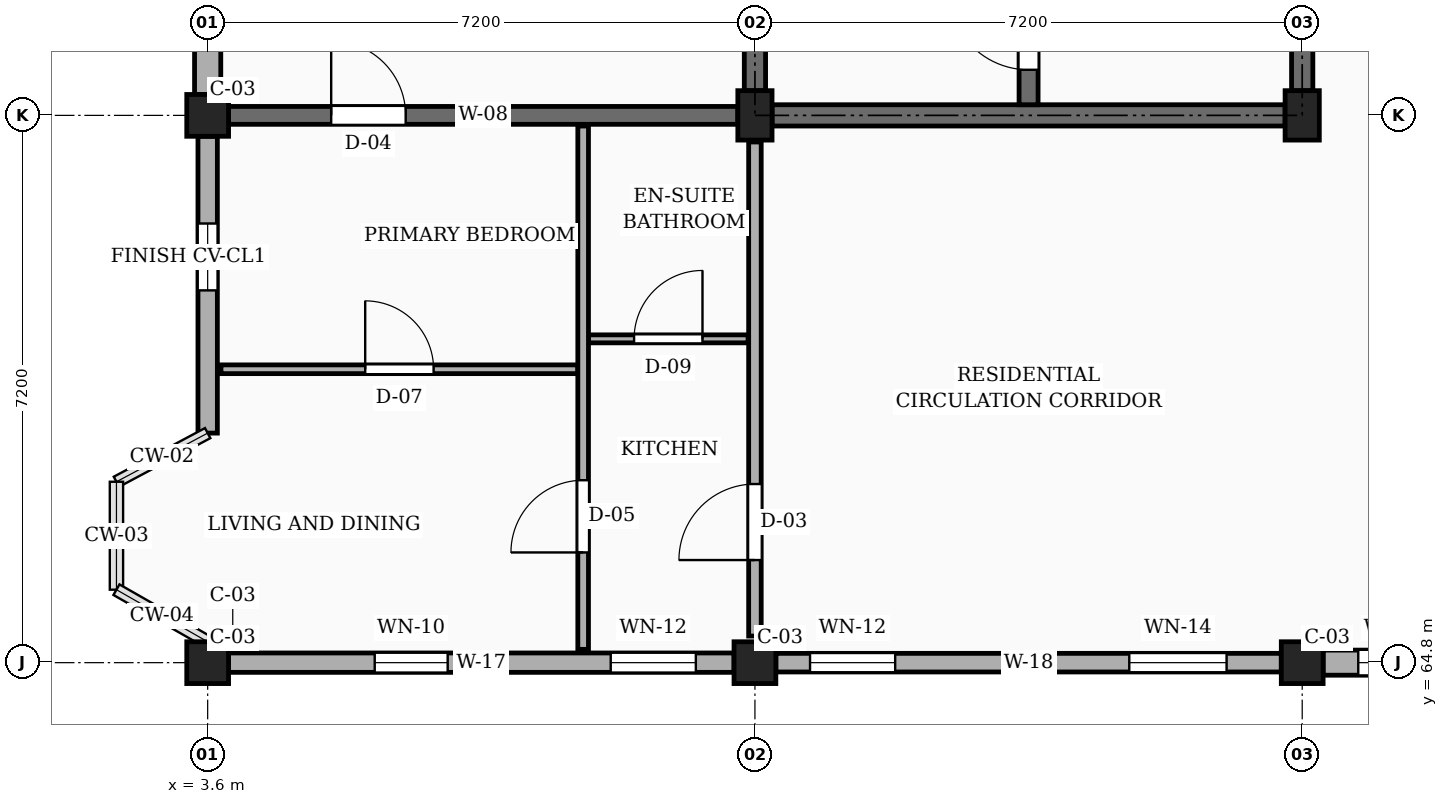
"""IFC4 building model, lengths in metres.
Left out: names, types, materials, properties, quantities, classifications, styles, units other than length and angle.
Written with IfcOpenShell. Run it as: python <this file> out.ifc"""

import sys

from ifc_helpers import new_model, si_unit, direction, frame, frame_2d, origin, origin_2d, place, context, subcontext, project, spatial, rectangle, extrude, element, fill, save


model = new_model("IFC4")
c1 = context("Model", 3, precision=1e-05, world=origin(), true_north=direction((0.0, 1.0)))
c2 = subcontext(c1, "Body", "Model", "MODEL_VIEW")
j1 = project(units=[si_unit("LENGTHUNIT", "METRE"), si_unit("PLANEANGLEUNIT", "RADIAN")], contexts=[c1])
p1 = place(None, origin())
s1 = spatial("IfcSite", under=j1, at=p1, CompositionType="ELEMENT")
p2 = place(p1, origin())
s2 = spatial("IfcBuilding", under=s1, at=p2, CompositionType="ELEMENT")
p3 = place(p2, frame((0.0, 0.0, 17.1)))
s3 = spatial("IfcBuildingStorey", under=s2, at=p3, CompositionType="ELEMENT", Elevation=17.1)
for number, where, z_axis, x_axis in (
    (1, (3.6, 64.8, 0.0), (0.0, 0.0, 1.0), (1.0, 0.0, 0.0)),
    (2, (3.6, 72.0, 0.0), (0.0, 0.0, 1.0), (1.0, 0.0, 0.0)),
    (3, (10.8, 64.8, 0.0), (0.0, 0.0, 1.0), (1.0, 0.0, 0.0)),
):
    element("IfcColumn", number, at=place(p3, frame(where, z_axis=z_axis, x_axis=x_axis)), inside=s3, PredefinedType="COLUMN", context=c2, shape_type="SweptSolid", body=[
        extrude(rectangle(XDim=0.55, YDim=0.55, at=origin_2d()), origin(), (0.0, 0.0, 1.0), 3.15),
    ])
p4 = place(p3, frame((10.8, 72.0, 0.0), z_axis=(0.0, 0.0, 1.0), x_axis=(1.0, 0.0, 0.0)))
e4 = element("IfcColumn", 4, at=p4, inside=s3, PredefinedType="COLUMN", context=c2, shape_type="SweptSolid", body=[
    extrude(rectangle(XDim=0.45, YDim=0.65, at=origin_2d()), origin(), (0.0, 0.0, 1.0), 3.15),
])
p5 = place(p3, frame((18.0, 64.8, 0.0), z_axis=(0.0, 0.0, 1.0), x_axis=(1.0, 0.0, 0.0)))
e5 = element("IfcColumn", 5, at=p5, inside=s3, PredefinedType="COLUMN", context=c2, shape_type="SweptSolid", body=[
    extrude(rectangle(XDim=0.55, YDim=0.55, at=origin_2d()), origin(), (0.0, 0.0, 1.0), 3.15),
])
p6 = place(p3, frame((18.0, 72.0, 0.0), z_axis=(0.0, 0.0, 1.0), x_axis=(1.0, 0.0, 0.0)))
e6 = element("IfcColumn", 6, at=p6, inside=s3, PredefinedType="COLUMN", context=c2, shape_type="SweptSolid", body=[
    extrude(rectangle(XDim=0.45, YDim=0.65, at=origin_2d()), origin(), (0.0, 0.0, 1.0), 3.15),
])
p7 = place(p3, frame((3.875, 72.0, 0.0), z_axis=(0.0, 0.0, 1.0), x_axis=(1.0, 0.0, 0.0)))
e7 = element("IfcWall", 7, at=p7, inside=s3, PredefinedType="SOLIDWALL", context=c2, shape_type="SweptSolid", body=[
    extrude(rectangle(XDim=6.7, YDim=0.235, at=frame_2d((3.35, 0.0))), origin(), (0.0, 0.0, 1.0), 2.21),
])
p8 = place(p7, frame((1.35, 0.0, 0.0)))
e8 = element("IfcOpeningElement", 8, at=p8, cuts=e7, PredefinedType="OPENING", context=c2, shape_type="SweptSolid", body=[
    extrude(rectangle(XDim=0.98, YDim=2.12, at=frame_2d((0.49, 1.06))), frame((0.0, 0.127, 0.0), z_axis=(0.0, -1.0, 0.0), x_axis=(1.0, 0.0, 0.0)), (0.0, 0.0, 1.0), 0.255),
])
p9 = place(p3, frame((3.875, 64.8, 0.0), z_axis=(0.0, 0.0, 1.0), x_axis=(1.0, 0.0, 0.0)))
e9 = element("IfcWall", 9, at=p9, inside=s3, PredefinedType="SOLIDWALL", context=c2, shape_type="SweptSolid", body=[
    extrude(rectangle(XDim=6.65, YDim=0.255, at=frame_2d((3.325, 0.0))), origin(), (0.0, 0.0, 1.0), 2.48),
])
p10 = place(p9, frame((1.923, 0.0, 0.78)))
e10 = element("IfcOpeningElement", 10, at=p10, cuts=e9, PredefinedType="OPENING", context=c2, shape_type="SweptSolid", body=[
    extrude(rectangle(XDim=0.96, YDim=1.26, at=frame_2d((0.48, 0.63))), frame((0.0, 0.137, 0.0), z_axis=(0.0, -1.0, 0.0), x_axis=(1.0, 0.0, 0.0)), (0.0, 0.0, 1.0), 0.275),
])
p11 = place(p9, frame((5.028, 0.0, 0.78)))
e11 = element("IfcOpeningElement", 11, at=p11, cuts=e9, PredefinedType="OPENING", context=c2, shape_type="SweptSolid", body=[
    extrude(rectangle(XDim=1.12, YDim=1.26, at=frame_2d((0.56, 0.63))), frame((0.0, 0.137, 0.0), z_axis=(0.0, -1.0, 0.0), x_axis=(1.0, 0.0, 0.0)), (0.0, 0.0, 1.0), 0.275),
])
p12 = place(p3, frame((11.075, 64.8, 0.0), z_axis=(0.0, 0.0, 1.0), x_axis=(1.0, 0.0, 0.0)))
e12 = element("IfcWall", 12, at=p12, inside=s3, PredefinedType="SOLIDWALL", context=c2, shape_type="SweptSolid", body=[
    extrude(rectangle(XDim=6.65, YDim=0.245, at=frame_2d((3.325, 0.0))), origin(), (0.0, 0.0, 1.0), 2.48),
])
p13 = place(p12, frame((0.45, 0.0, 0.78)))
e13 = element("IfcOpeningElement", 13, at=p13, cuts=e12, PredefinedType="OPENING", context=c2, shape_type="SweptSolid", body=[
    extrude(rectangle(XDim=1.12, YDim=1.26, at=frame_2d((0.56, 0.63))), frame((0.0, 0.133, 0.0), z_axis=(0.0, -1.0, 0.0), x_axis=(1.0, 0.0, 0.0)), (0.0, 0.0, 1.0), 0.265),
])
p14 = place(p12, frame((4.65, 0.0, 0.78)))
e14 = element("IfcOpeningElement", 14, at=p14, cuts=e12, PredefinedType="OPENING", context=c2, shape_type="SweptSolid", body=[
    extrude(rectangle(XDim=1.28, YDim=1.26, at=frame_2d((0.64, 0.63))), frame((0.0, 0.133, 0.0), z_axis=(0.0, -1.0, 0.0), x_axis=(1.0, 0.0, 0.0)), (0.0, 0.0, 1.0), 0.265),
])
p15 = place(p3, frame((18.275, 64.8, 0.0), z_axis=(0.0, 0.0, 1.0), x_axis=(1.0, 0.0, 0.0)))
e15 = element("IfcWall", 15, at=p15, inside=s3, PredefinedType="SOLIDWALL", context=c2, shape_type="SweptSolid", body=[
    extrude(rectangle(XDim=6.65, YDim=0.33, at=frame_2d((3.325, 0.0))), origin(), (0.0, 0.0, 1.0), 2.48),
])
p16 = place(p15, frame((0.462, 0.0, 0.78)))
e16 = element("IfcOpeningElement", 16, at=p16, cuts=e15, PredefinedType="OPENING", context=c2, shape_type="SweptSolid", body=[
    extrude(rectangle(XDim=1.04, YDim=1.26, at=frame_2d((0.52, 0.63))), frame((0.0, 0.175, 0.0), z_axis=(0.0, -1.0, 0.0), x_axis=(1.0, 0.0, 0.0)), (0.0, 0.0, 1.0), 0.35),
])
p17 = place(p15, frame((2.115, 0.0, 0.78)))
e17 = element("IfcOpeningElement", 17, at=p17, cuts=e15, PredefinedType="OPENING", context=c2, shape_type="SweptSolid", body=[
    extrude(rectangle(XDim=1.44, YDim=1.26, at=frame_2d((0.72, 0.63))), frame((0.0, 0.175, 0.0), z_axis=(0.0, -1.0, 0.0), x_axis=(1.0, 0.0, 0.0)), (0.0, 0.0, 1.0), 0.35),
])
p18 = place(p15, frame((4.688, 0.0, 0.78)))
e18 = element("IfcOpeningElement", 18, at=p18, cuts=e15, PredefinedType="OPENING", context=c2, shape_type="SweptSolid", body=[
    extrude(rectangle(XDim=0.98, YDim=1.36, at=frame_2d((0.49, 0.68))), frame((0.0, 0.175, 0.0), z_axis=(0.0, -1.0, 0.0), x_axis=(1.0, 0.0, 0.0)), (0.0, 0.0, 1.0), 0.35),
])
p19 = place(p3, frame((3.6, 78.925, 0.0), z_axis=(0.0, 0.0, 1.0), x_axis=(0.0, -1.0, 0.0)))
e19 = element("IfcWall", 19, at=p19, inside=s3, PredefinedType="SOLIDWALL", context=c2, shape_type="SweptSolid", body=[
    extrude(rectangle(XDim=6.65, YDim=0.345, at=frame_2d((3.325, 0.0))), origin(), (0.0, 0.0, 1.0), 2.48),
])
p20 = place(p19, frame((0.45, 0.0, 0.78)))
e20 = element("IfcOpeningElement", 20, at=p20, cuts=e19, PredefinedType="OPENING", context=c2, shape_type="SweptSolid", body=[
    extrude(rectangle(XDim=1.32, YDim=1.15, at=frame_2d((0.66, 0.575))), frame((0.0, 0.183, 0.0), z_axis=(0.0, -1.0, 0.0), x_axis=(1.0, 0.0, 0.0)), (0.0, 0.0, 1.0), 0.365),
])
p21 = place(p19, frame((4.65, 0.0, 0.78)))
e21 = element("IfcOpeningElement", 21, at=p21, cuts=e19, PredefinedType="OPENING", context=c2, shape_type="SweptSolid", body=[
    extrude(rectangle(XDim=0.88, YDim=1.26, at=frame_2d((0.44, 0.63))), frame((0.0, 0.183, 0.0), z_axis=(0.0, -1.0, 0.0), x_axis=(1.0, 0.0, 0.0)), (0.0, 0.0, 1.0), 0.365),
])
p22 = place(p3, frame((3.6, 71.725, 0.0), z_axis=(0.0, 0.0, 1.0), x_axis=(0.0, -1.0, 0.0)))
e22 = element("IfcWall", 22, at=p22, inside=s3, PredefinedType="SOLIDWALL", context=c2, shape_type="SweptSolid", body=[
    extrude(rectangle(XDim=3.905, YDim=0.255, at=frame_2d((1.953, 0.0))), origin(), (0.0, 0.0, 1.0), 2.48),
])
p23 = place(p22, frame((1.147, 0.0, 0.78)))
e23 = element("IfcOpeningElement", 23, at=p23, cuts=e22, PredefinedType="OPENING", context=c2, shape_type="SweptSolid", body=[
    extrude(rectangle(XDim=0.88, YDim=1.26, at=frame_2d((0.44, 0.63))), frame((0.0, 0.137, 0.0), z_axis=(0.0, -1.0, 0.0), x_axis=(1.0, 0.0, 0.0)), (0.0, 0.0, 1.0), 0.275),
])
p24 = place(p3, frame((10.8, 72.325, 0.0), z_axis=(0.0, 0.0, 1.0), x_axis=(0.0, 1.0, 0.0)))
e24 = element("IfcWall", 24, at=p24, inside=s3, PredefinedType="SHEAR", context=c2, shape_type="SweptSolid", body=[
    extrude(rectangle(XDim=6.55, YDim=0.28, at=frame_2d((3.275, 0.0))), origin(), (0.0, 0.0, 1.0), 2.91),
])
p25 = place(p3, frame((18.0, 72.325, 0.0), z_axis=(0.0, 0.0, 1.0), x_axis=(0.0, 1.0, 0.0)))
e25 = element("IfcWall", 25, at=p25, inside=s3, PredefinedType="SHEAR", context=c2, shape_type="SweptSolid", body=[
    extrude(rectangle(XDim=6.55, YDim=0.28, at=frame_2d((3.275, 0.0))), origin(), (0.0, 0.0, 1.0), 2.91),
])
p26 = place(p25, frame((1.5, 0.0, 0.0)))
e26 = element("IfcOpeningElement", 26, at=p26, cuts=e25, PredefinedType="OPENING", context=c2, shape_type="SweptSolid", body=[
    extrude(rectangle(XDim=1.1, YDim=2.15, at=frame_2d((0.55, 1.075))), frame((0.0, 0.15, 0.0), z_axis=(0.0, -1.0, 0.0), x_axis=(1.0, 0.0, 0.0)), (0.0, 0.0, 1.0), 0.3),
])
p27 = place(p3, frame((11.025, 72.0, 0.0), z_axis=(0.0, 0.0, 1.0), x_axis=(1.0, 0.0, 0.0)))
e27 = element("IfcWall", 27, at=p27, inside=s3, PredefinedType="SHEAR", context=c2, shape_type="SweptSolid", body=[
    extrude(rectangle(XDim=6.75, YDim=0.28, at=frame_2d((3.375, 0.0))), origin(), (0.0, 0.0, 1.0), 2.91),
])
p28 = place(p3, frame((14.4, 72.14, 0.0), z_axis=(0.0, 0.0, 1.0), x_axis=(0.0, 1.0, 0.0)))
e28 = element("IfcWall", 28, at=p28, inside=s3, PredefinedType="SHEAR", context=c2, shape_type="SweptSolid", body=[
    extrude(rectangle(XDim=6.92, YDim=0.25, at=frame_2d((3.46, 0.0))), origin(), (0.0, 0.0, 1.0), 2.91),
])
p29 = place(p28, frame((0.46, 0.0, 0.0)))
e29 = element("IfcOpeningElement", 29, at=p29, cuts=e28, PredefinedType="OPENING", context=c2, shape_type="SweptSolid", body=[
    extrude(rectangle(XDim=1.05, YDim=2.15, at=frame_2d((0.525, 1.075))), frame((0.0, 0.135, 0.0), z_axis=(0.0, -1.0, 0.0), x_axis=(1.0, 0.0, 0.0)), (0.0, 0.0, 1.0), 0.27),
])
p30 = place(p3, frame((10.8, 65.15, 0.0), z_axis=(0.0, 0.0, 1.0), x_axis=(0.0, 1.0, 0.0)))
e30 = element("IfcWall", 30, at=p30, inside=s3, PredefinedType="PARTITIONING", context=c2, shape_type="SweptSolid", body=[
    extrude(rectangle(XDim=6.5, YDim=0.165, at=frame_2d((3.25, 0.0))), origin(), (0.0, 0.0, 1.0), 2.345),
])
p31 = place(p30, frame((1.0, 0.0, 0.0)))
e31 = element("IfcOpeningElement", 31, at=p31, cuts=e30, PredefinedType="OPENING", context=c2, shape_type="SweptSolid", body=[
    extrude(rectangle(XDim=1.0, YDim=2.15, at=frame_2d((0.5, 1.075))), frame((0.0, 0.093, 0.0), z_axis=(0.0, -1.0, 0.0), x_axis=(1.0, 0.0, 0.0)), (0.0, 0.0, 1.0), 0.185),
])
p32 = place(p3, frame((3.775, 68.66, 0.0), z_axis=(0.0, 0.0, 1.0), x_axis=(1.0, 0.0, 0.0)))
e32 = element("IfcWall", 32, at=p32, inside=s3, PredefinedType="PARTITIONING", context=c2, shape_type="SweptSolid", body=[
    extrude(rectangle(XDim=4.695, YDim=0.115, at=frame_2d((2.348, 0.0))), origin(), (0.0, 0.0, 1.0), 2.345),
])
p33 = place(p32, frame((1.897, 0.0, 0.0)))
e33 = element("IfcOpeningElement", 33, at=p33, cuts=e32, PredefinedType="OPENING", context=c2, shape_type="SweptSolid", body=[
    extrude(rectangle(XDim=0.9, YDim=2.1, at=frame_2d((0.45, 1.05))), frame((0.0, 0.067, 0.0), z_axis=(0.0, -1.0, 0.0), x_axis=(1.0, 0.0, 0.0)), (0.0, 0.0, 1.0), 0.135),
])
p34 = place(p3, frame((8.61, 69.06, 0.0), z_axis=(0.0, 0.0, 1.0), x_axis=(1.0, 0.0, 0.0)))
e34 = element("IfcWall", 34, at=p34, inside=s3, PredefinedType="PARTITIONING", context=c2, shape_type="SweptSolid", body=[
    extrude(rectangle(XDim=2.1, YDim=0.105, at=frame_2d((1.05, 0.0))), origin(), (0.0, 0.0, 1.0), 2.345),
])
p35 = place(p34, frame((0.6, 0.0, 0.0)))
e35 = element("IfcOpeningElement", 35, at=p35, cuts=e34, PredefinedType="OPENING", context=c2, shape_type="SweptSolid", body=[
    extrude(rectangle(XDim=0.9, YDim=2.05, at=frame_2d((0.45, 1.025))), frame((0.0, 0.062, 0.0), z_axis=(0.0, -1.0, 0.0), x_axis=(1.0, 0.0, 0.0)), (0.0, 0.0, 1.0), 0.125),
])
p36 = place(p3, frame((8.54, 64.975, 0.0), z_axis=(0.0, 0.0, 1.0), x_axis=(0.0, 1.0, 0.0)))
e36 = element("IfcWall", 36, at=p36, inside=s3, PredefinedType="PARTITIONING", context=c2, shape_type="SweptSolid", body=[
    extrude(rectangle(XDim=6.885, YDim=0.14, at=frame_2d((3.442, 0.0))), origin(), (0.0, 0.0, 1.0), 2.345),
])
p37 = place(p36, frame((1.275, 0.0, 0.0)))
e37 = element("IfcOpeningElement", 37, at=p37, cuts=e36, PredefinedType="OPENING", context=c2, shape_type="SweptSolid", body=[
    extrude(rectangle(XDim=0.95, YDim=2.1, at=frame_2d((0.475, 1.05))), frame((0.0, 0.08, 0.0), z_axis=(0.0, -1.0, 0.0), x_axis=(1.0, 0.0, 0.0)), (0.0, 0.0, 1.0), 0.16),
])
p38 = place(p10, origin())
e38 = element("IfcWindow", 38, at=p38, inside=s3, PartitioningType="SINGLE_PANEL", PredefinedType="WINDOW", context=c2, shape_type="SweptSolid", body=[
    extrude(rectangle(XDim=0.96, YDim=1.26, at=frame_2d((0.48, 0.63))), frame((0.0, 0.03, 0.0), z_axis=(0.0, -1.0, 0.0), x_axis=(1.0, 0.0, 0.0)), (0.0, 0.0, 1.0), 0.06),
])
fill(e10, e38)
p39 = place(p11, origin())
e39 = element("IfcWindow", 39, at=p39, inside=s3, PartitioningType="SINGLE_PANEL", PredefinedType="WINDOW", context=c2, shape_type="SweptSolid", body=[
    extrude(rectangle(XDim=1.12, YDim=1.26, at=frame_2d((0.56, 0.63))), frame((0.0, 0.03, 0.0), z_axis=(0.0, -1.0, 0.0), x_axis=(1.0, 0.0, 0.0)), (0.0, 0.0, 1.0), 0.06),
])
fill(e11, e39)
p40 = place(p13, origin())
e40 = element("IfcWindow", 40, at=p40, inside=s3, PartitioningType="SINGLE_PANEL", PredefinedType="WINDOW", context=c2, shape_type="SweptSolid", body=[
    extrude(rectangle(XDim=1.12, YDim=1.26, at=frame_2d((0.56, 0.63))), frame((0.0, 0.03, 0.0), z_axis=(0.0, -1.0, 0.0), x_axis=(1.0, 0.0, 0.0)), (0.0, 0.0, 1.0), 0.06),
])
fill(e13, e40)
p41 = place(p14, origin())
e41 = element("IfcWindow", 41, at=p41, inside=s3, PartitioningType="SINGLE_PANEL", PredefinedType="WINDOW", context=c2, shape_type="SweptSolid", body=[
    extrude(rectangle(XDim=1.28, YDim=1.26, at=frame_2d((0.64, 0.63))), frame((0.0, 0.03, 0.0), z_axis=(0.0, -1.0, 0.0), x_axis=(1.0, 0.0, 0.0)), (0.0, 0.0, 1.0), 0.06),
])
fill(e14, e41)
p42 = place(p16, origin())
e42 = element("IfcWindow", 42, at=p42, inside=s3, PartitioningType="SINGLE_PANEL", PredefinedType="WINDOW", context=c2, shape_type="SweptSolid", body=[
    extrude(rectangle(XDim=1.04, YDim=1.26, at=frame_2d((0.52, 0.63))), frame((0.0, 0.03, 0.0), z_axis=(0.0, -1.0, 0.0), x_axis=(1.0, 0.0, 0.0)), (0.0, 0.0, 1.0), 0.06),
])
fill(e16, e42)
p43 = place(p23, origin())
e43 = element("IfcWindow", 43, at=p43, inside=s3, PartitioningType="SINGLE_PANEL", PredefinedType="WINDOW", context=c2, shape_type="SweptSolid", body=[
    extrude(rectangle(XDim=0.88, YDim=1.26, at=frame_2d((0.44, 0.63))), frame((0.0, 0.03, 0.0), z_axis=(0.0, -1.0, 0.0), x_axis=(1.0, 0.0, 0.0)), (0.0, 0.0, 1.0), 0.06),
])
fill(e23, e43)
p44 = place(p29, origin())
e44 = element("IfcDoor", 44, at=p44, inside=s3, OperationType="SINGLE_SWING_RIGHT", PredefinedType="DOOR", context=c2, shape_type="SweptSolid", body=[
    extrude(rectangle(XDim=1.05, YDim=2.15, at=frame_2d((0.525, 1.075))), frame((0.0, 0.025, 0.0), z_axis=(0.0, -1.0, 0.0), x_axis=(1.0, 0.0, 0.0)), (0.0, 0.0, 1.0), 0.05),
])
fill(e29, e44)
p45 = place(p31, origin())
e45 = element("IfcDoor", 45, at=p45, inside=s3, OperationType="SINGLE_SWING_LEFT", PredefinedType="DOOR", context=c2, shape_type="SweptSolid", body=[
    extrude(rectangle(XDim=1.0, YDim=2.15, at=frame_2d((0.5, 1.075))), frame((0.0, 0.025, 0.0), z_axis=(0.0, -1.0, 0.0), x_axis=(1.0, 0.0, 0.0)), (0.0, 0.0, 1.0), 0.05),
])
fill(e31, e45)
p46 = place(p33, origin())
e46 = element("IfcDoor", 46, at=p46, inside=s3, OperationType="SINGLE_SWING_LEFT", PredefinedType="DOOR", context=c2, shape_type="SweptSolid", body=[
    extrude(rectangle(XDim=0.9, YDim=2.1, at=frame_2d((0.45, 1.05))), frame((0.0, 0.025, 0.0), z_axis=(0.0, -1.0, 0.0), x_axis=(1.0, 0.0, 0.0)), (0.0, 0.0, 1.0), 0.05),
])
fill(e33, e46)
p47 = place(p35, origin())
e47 = element("IfcDoor", 47, at=p47, inside=s3, OperationType="SINGLE_SWING_RIGHT", PredefinedType="DOOR", context=c2, shape_type="SweptSolid", body=[
    extrude(rectangle(XDim=0.9, YDim=2.05, at=frame_2d((0.45, 1.025))), frame((0.0, 0.025, 0.0), z_axis=(0.0, -1.0, 0.0), x_axis=(1.0, 0.0, 0.0)), (0.0, 0.0, 1.0), 0.05),
])
fill(e35, e47)
p48 = place(p37, origin())
e48 = element("IfcDoor", 48, at=p48, inside=s3, OperationType="SINGLE_SWING_LEFT", PredefinedType="DOOR", context=c2, shape_type="SweptSolid", body=[
    extrude(rectangle(XDim=0.95, YDim=2.1, at=frame_2d((0.475, 1.05))), frame((0.0, 0.025, 0.0), z_axis=(0.0, -1.0, 0.0), x_axis=(1.0, 0.0, 0.0)), (0.0, 0.0, 1.0), 0.05),
])
fill(e37, e48)
p49 = place(p8, origin())
e49 = element("IfcDoor", 49, at=p49, inside=s3, OperationType="SINGLE_SWING_LEFT", PredefinedType="DOOR", context=c2, shape_type="SweptSolid", body=[
    extrude(rectangle(XDim=0.98, YDim=2.12, at=frame_2d((0.49, 1.06))), frame((0.0, 0.025, 0.0), z_axis=(0.0, -1.0, 0.0), x_axis=(1.0, 0.0, 0.0)), (0.0, 0.0, 1.0), 0.05),
])
fill(e8, e49)
save(model, sys.argv[1])
